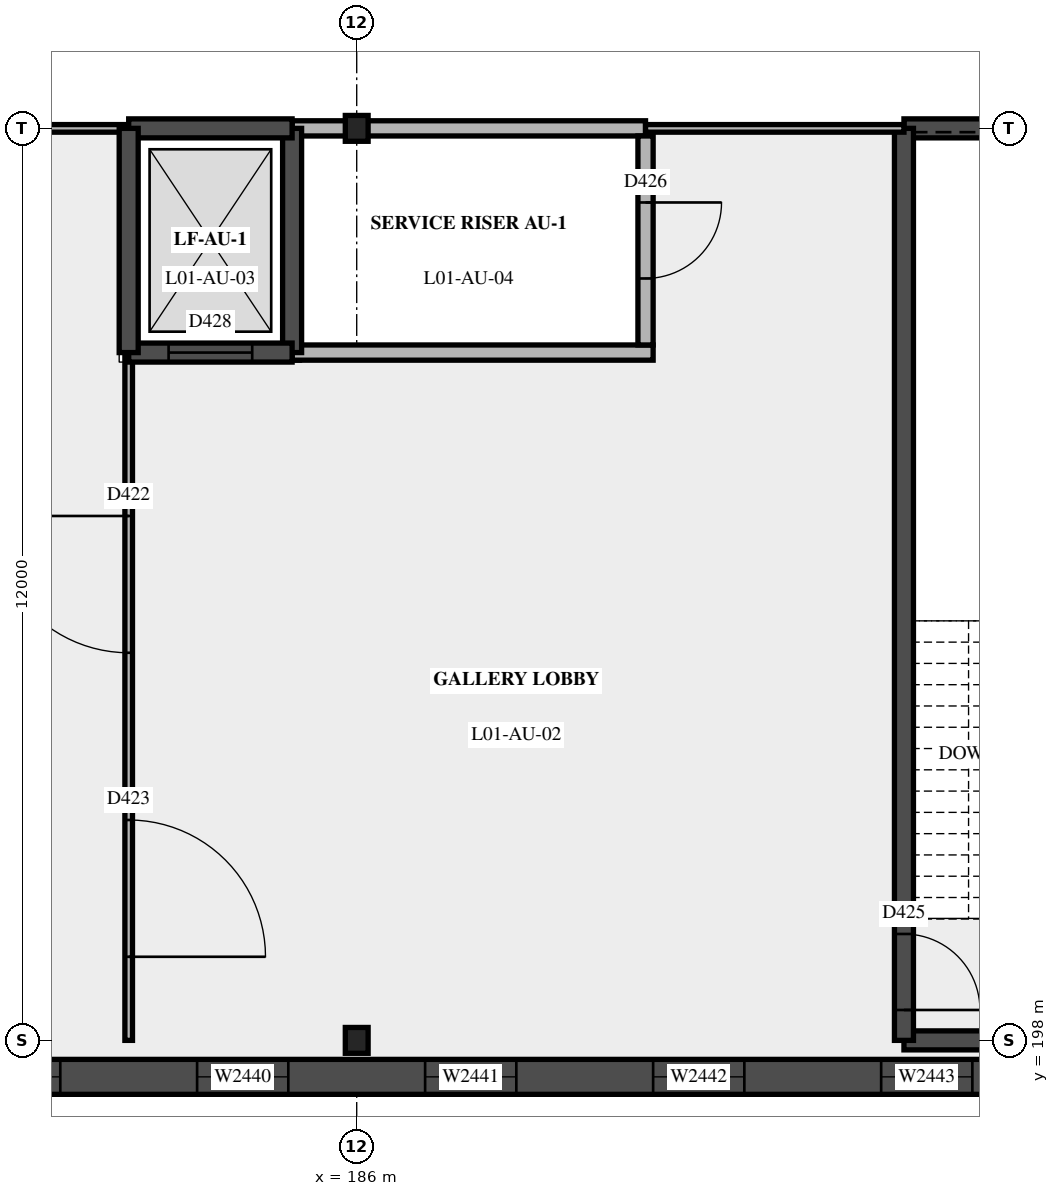
"""IFC4 building model, lengths in metres.
Left out: names, types, materials, properties, quantities, classifications, styles, units other than length and angle.
Written with IfcOpenShell. Run it as: python <this file> out.ifc"""

import sys

from ifc_helpers import new_model, si_unit, direction, frame, frame_2d, origin, origin_2d, place, context, subcontext, project, spatial, rectangle, i_section, extrude, element, fill, save


model = new_model("IFC4")
c1 = context("Model", 3, precision=1e-05, world=origin(), true_north=direction((0.0, 1.0)))
c2 = subcontext(c1, "Body", "Model", "MODEL_VIEW")
j1 = project(units=[si_unit("LENGTHUNIT", "METRE"), si_unit("PLANEANGLEUNIT", "RADIAN")], contexts=[c1])
p1 = place(None, origin())
s1 = spatial("IfcSite", under=j1, at=p1, CompositionType="ELEMENT")
p2 = place(p1, origin())
s2 = spatial("IfcBuilding", under=s1, at=p2, CompositionType="ELEMENT")
p3 = place(p2, frame((0.0, 0.0, 5.4)))
s3 = spatial("IfcBuildingStorey", under=s2, at=p3, CompositionType="ELEMENT", Elevation=5.4)
for number, where, z_axis, x_axis in (
    (1, (186.0, 198.0, 0.0), (0.0, 0.0, 1.0), (1.0, 0.0, 0.0)),
    (2, (186.0, 210.0, 0.0), (0.0, 0.0, 1.0), (1.0, 0.0, 0.0)),
):
    element("IfcColumn", number, at=place(p3, frame(where, z_axis=z_axis, x_axis=x_axis)), inside=s3, PredefinedType="COLUMN", context=c2, shape_type="SweptSolid", body=[
        extrude(i_section(OverallWidth=0.3, OverallDepth=0.34, WebThickness=0.012, FlangeThickness=0.021, at=origin_2d()), origin(), (0.0, 0.0, 1.0), 5.4),
    ])
for number, where, z_axis, x_axis in (
    (3, (193.2, 198.0, 0.0), (0.0, 0.0, 1.0), (1.0, 0.0, 0.0)),
    (4, (193.2, 210.0, 0.0), (0.0, 0.0, 1.0), (1.0, 0.0, 0.0)),
):
    element("IfcWall", number, at=place(p3, frame(where, z_axis=z_axis, x_axis=x_axis)), inside=s3, PredefinedType="SHEAR", context=c2, shape_type="SweptSolid", body=[
        extrude(rectangle(XDim=4.65, YDim=0.25, at=frame_2d((2.325, 0.0))), origin(), (0.0, 0.0, 1.0), 4.6),
    ])
p4 = place(p3, frame((193.2, 198.0, 0.0), z_axis=(0.0, 0.0, 1.0), x_axis=(0.0, 1.0, 0.0)))
e5 = element("IfcWall", 5, at=p4, inside=s3, PredefinedType="SHEAR", context=c2, shape_type="SweptSolid", body=[
    extrude(rectangle(XDim=12.0, YDim=0.25, at=frame_2d((6.0, 0.0))), origin(), (0.0, 0.0, 1.0), 4.6),
])
p5 = place(p4, frame((0.4, 0.0, 0.0)))
e6 = element("IfcOpeningElement", 6, at=p5, cuts=e5, PredefinedType="OPENING", context=c2, shape_type="SweptSolid", body=[
    extrude(rectangle(XDim=1.0, YDim=2.1, at=frame_2d((0.5, 1.05))), frame((0.0, 0.135, 0.0), z_axis=(0.0, -1.0, 0.0), x_axis=(1.0, 0.0, 0.0)), (0.0, 0.0, 1.0), 0.27),
])
p6 = place(p3, frame((161.75, 197.52, 0.0), z_axis=(0.0, 0.0, 1.0), x_axis=(1.0, 0.0, 0.0)))
e7 = element("IfcWall", 7, at=p6, inside=s3, PredefinedType="SOLIDWALL", context=c2, shape_type="SweptSolid", body=[
    extrude(rectangle(XDim=36.5, YDim=0.46, at=frame_2d((18.25, 0.0))), origin(), (0.0, 0.0, 1.0), 5.4),
])
p7 = place(p6, frame((1.15, 0.0, 0.9)))
e8 = element("IfcOpeningElement", 8, at=p7, cuts=e7, PredefinedType="OPENING", context=c2, shape_type="SweptSolid", body=[
    extrude(rectangle(XDim=1.2, YDim=3.3, at=frame_2d((0.6, 1.65))), frame((0.0, 0.24, 0.0), z_axis=(0.0, -1.0, 0.0), x_axis=(1.0, 0.0, 0.0)), (0.0, 0.0, 1.0), 0.48),
])
p8 = place(p6, frame((4.15, 0.0, 0.9)))
e9 = element("IfcOpeningElement", 9, at=p8, cuts=e7, PredefinedType="OPENING", context=c2, shape_type="SweptSolid", body=[
    extrude(rectangle(XDim=1.2, YDim=3.3, at=frame_2d((0.6, 1.65))), frame((0.0, 0.24, 0.0), z_axis=(0.0, -1.0, 0.0), x_axis=(1.0, 0.0, 0.0)), (0.0, 0.0, 1.0), 0.48),
])
p9 = place(p6, frame((7.15, 0.0, 0.9)))
e10 = element("IfcOpeningElement", 10, at=p9, cuts=e7, PredefinedType="OPENING", context=c2, shape_type="SweptSolid", body=[
    extrude(rectangle(XDim=1.2, YDim=3.3, at=frame_2d((0.6, 1.65))), frame((0.0, 0.24, 0.0), z_axis=(0.0, -1.0, 0.0), x_axis=(1.0, 0.0, 0.0)), (0.0, 0.0, 1.0), 0.48),
])
p10 = place(p6, frame((10.15, 0.0, 0.9)))
e11 = element("IfcOpeningElement", 11, at=p10, cuts=e7, PredefinedType="OPENING", context=c2, shape_type="SweptSolid", body=[
    extrude(rectangle(XDim=1.2, YDim=3.3, at=frame_2d((0.6, 1.65))), frame((0.0, 0.24, 0.0), z_axis=(0.0, -1.0, 0.0), x_axis=(1.0, 0.0, 0.0)), (0.0, 0.0, 1.0), 0.48),
])
p11 = place(p6, frame((13.15, 0.0, 0.9)))
e12 = element("IfcOpeningElement", 12, at=p11, cuts=e7, PredefinedType="OPENING", context=c2, shape_type="SweptSolid", body=[
    extrude(rectangle(XDim=1.2, YDim=3.3, at=frame_2d((0.6, 1.65))), frame((0.0, 0.24, 0.0), z_axis=(0.0, -1.0, 0.0), x_axis=(1.0, 0.0, 0.0)), (0.0, 0.0, 1.0), 0.48),
])
p12 = place(p6, frame((16.15, 0.0, 0.9)))
e13 = element("IfcOpeningElement", 13, at=p12, cuts=e7, PredefinedType="OPENING", context=c2, shape_type="SweptSolid", body=[
    extrude(rectangle(XDim=1.2, YDim=3.3, at=frame_2d((0.6, 1.65))), frame((0.0, 0.24, 0.0), z_axis=(0.0, -1.0, 0.0), x_axis=(1.0, 0.0, 0.0)), (0.0, 0.0, 1.0), 0.48),
])
p13 = place(p6, frame((19.15, 0.0, 0.9)))
e14 = element("IfcOpeningElement", 14, at=p13, cuts=e7, PredefinedType="OPENING", context=c2, shape_type="SweptSolid", body=[
    extrude(rectangle(XDim=1.2, YDim=3.3, at=frame_2d((0.6, 1.65))), frame((0.0, 0.24, 0.0), z_axis=(0.0, -1.0, 0.0), x_axis=(1.0, 0.0, 0.0)), (0.0, 0.0, 1.0), 0.48),
])
p14 = place(p6, frame((22.15, 0.0, 0.9)))
e15 = element("IfcOpeningElement", 15, at=p14, cuts=e7, PredefinedType="OPENING", context=c2, shape_type="SweptSolid", body=[
    extrude(rectangle(XDim=1.2, YDim=3.3, at=frame_2d((0.6, 1.65))), frame((0.0, 0.24, 0.0), z_axis=(0.0, -1.0, 0.0), x_axis=(1.0, 0.0, 0.0)), (0.0, 0.0, 1.0), 0.48),
])
p15 = place(p6, frame((25.15, 0.0, 0.9)))
e16 = element("IfcOpeningElement", 16, at=p15, cuts=e7, PredefinedType="OPENING", context=c2, shape_type="SweptSolid", body=[
    extrude(rectangle(XDim=1.2, YDim=3.3, at=frame_2d((0.6, 1.65))), frame((0.0, 0.24, 0.0), z_axis=(0.0, -1.0, 0.0), x_axis=(1.0, 0.0, 0.0)), (0.0, 0.0, 1.0), 0.48),
])
p16 = place(p6, frame((28.15, 0.0, 0.9)))
e17 = element("IfcOpeningElement", 17, at=p16, cuts=e7, PredefinedType="OPENING", context=c2, shape_type="SweptSolid", body=[
    extrude(rectangle(XDim=1.2, YDim=3.3, at=frame_2d((0.6, 1.65))), frame((0.0, 0.24, 0.0), z_axis=(0.0, -1.0, 0.0), x_axis=(1.0, 0.0, 0.0)), (0.0, 0.0, 1.0), 0.48),
])
p17 = place(p6, frame((31.15, 0.0, 0.9)))
e18 = element("IfcOpeningElement", 18, at=p17, cuts=e7, PredefinedType="OPENING", context=c2, shape_type="SweptSolid", body=[
    extrude(rectangle(XDim=1.2, YDim=3.3, at=frame_2d((0.6, 1.65))), frame((0.0, 0.24, 0.0), z_axis=(0.0, -1.0, 0.0), x_axis=(1.0, 0.0, 0.0)), (0.0, 0.0, 1.0), 0.48),
])
p18 = place(p6, frame((34.15, 0.0, 0.9)))
e19 = element("IfcOpeningElement", 19, at=p18, cuts=e7, PredefinedType="OPENING", context=c2, shape_type="SweptSolid", body=[
    extrude(rectangle(XDim=1.2, YDim=3.3, at=frame_2d((0.6, 1.65))), frame((0.0, 0.24, 0.0), z_axis=(0.0, -1.0, 0.0), x_axis=(1.0, 0.0, 0.0)), (0.0, 0.0, 1.0), 0.48),
])
p19 = place(p3, frame((185.15, 207.05, 0.0), z_axis=(0.0, 0.0, 1.0), x_axis=(1.0, 0.0, 0.0)))
e20 = element("IfcWall", 20, at=p19, inside=s3, PredefinedType="PARTITIONING", context=c2, shape_type="SweptSolid", body=[
    extrude(rectangle(XDim=4.75, YDim=0.2, at=frame_2d((2.375, 0.0))), origin(), (0.0, 0.0, 1.0), 3.6),
])
p20 = place(p3, frame((162.0, 210.0, 0.0), z_axis=(0.0, 0.0, 1.0), x_axis=(1.0, 0.0, 0.0)))
e21 = element("IfcWall", 21, at=p20, inside=s3, PredefinedType="PARTITIONING", context=c2, shape_type="SweptSolid", body=[
    extrude(rectangle(XDim=21.0, YDim=0.1, at=frame_2d((10.5, 0.0))), origin(), (0.0, 0.0, 1.0), 3.6),
])
p21 = place(p3, frame((185.15, 210.0, 0.0), z_axis=(0.0, 0.0, 1.0), x_axis=(1.0, 0.0, 0.0)))
e22 = element("IfcWall", 22, at=p21, inside=s3, PredefinedType="PARTITIONING", context=c2, shape_type="SweptSolid", body=[
    extrude(rectangle(XDim=4.65, YDim=0.2, at=frame_2d((2.325, 0.0))), origin(), (0.0, 0.0, 1.0), 3.6),
])
p22 = place(p3, frame((189.8, 210.0, 0.0), z_axis=(0.0, 0.0, 1.0), x_axis=(1.0, 0.0, 0.0)))
e23 = element("IfcWall", 23, at=p22, inside=s3, PredefinedType="PARTITIONING", context=c2, shape_type="SweptSolid", body=[
    extrude(rectangle(XDim=3.4, YDim=0.1, at=frame_2d((1.7, 0.0))), origin(), (0.0, 0.0, 1.0), 3.6),
])
p23 = place(p3, frame((183.0, 198.0, 0.0), z_axis=(0.0, 0.0, 1.0), x_axis=(0.0, 1.0, 0.0)))
e24 = element("IfcWall", 24, at=p23, inside=s3, PredefinedType="PARTITIONING", context=c2, shape_type="SweptSolid", body=[
    extrude(rectangle(XDim=9.05, YDim=0.1, at=frame_2d((4.525, 0.0))), origin(), (0.0, 0.0, 1.0), 3.6),
])
p24 = place(p23, frame((5.1, 0.0, 0.0)))
e25 = element("IfcOpeningElement", 25, at=p24, cuts=e24, PredefinedType="OPENING", context=c2, shape_type="SweptSolid", body=[
    extrude(rectangle(XDim=1.8, YDim=2.1, at=frame_2d((0.9, 1.05))), frame((0.0, 0.06, 0.0), z_axis=(0.0, -1.0, 0.0), x_axis=(1.0, 0.0, 0.0)), (0.0, 0.0, 1.0), 0.12),
])
p25 = place(p23, frame((1.1, 0.0, 0.0)))
e26 = element("IfcOpeningElement", 26, at=p25, cuts=e24, PredefinedType="OPENING", context=c2, shape_type="SweptSolid", body=[
    extrude(rectangle(XDim=1.8, YDim=2.1, at=frame_2d((0.9, 1.05))), frame((0.0, 0.06, 0.0), z_axis=(0.0, -1.0, 0.0), x_axis=(1.0, 0.0, 0.0)), (0.0, 0.0, 1.0), 0.12),
])
p26 = place(p3, frame((189.8, 207.15, 0.0), z_axis=(0.0, 0.0, 1.0), x_axis=(0.0, 1.0, 0.0)))
e27 = element("IfcWall", 27, at=p26, inside=s3, PredefinedType="PARTITIONING", context=c2, shape_type="SweptSolid", body=[
    extrude(rectangle(XDim=2.75, YDim=0.2, at=frame_2d((1.375, 0.0))), origin(), (0.0, 0.0, 1.0), 3.6),
])
p27 = place(p26, frame((0.875, 0.0, 0.0)))
e28 = element("IfcOpeningElement", 28, at=p27, cuts=e27, PredefinedType="OPENING", context=c2, shape_type="SweptSolid", body=[
    extrude(rectangle(XDim=1.0, YDim=2.1, at=frame_2d((0.5, 1.05))), frame((0.0, 0.11, 0.0), z_axis=(0.0, -1.0, 0.0), x_axis=(1.0, 0.0, 0.0)), (0.0, 0.0, 1.0), 0.22),
])
p28 = place(p3, frame((185.15, 207.05, 0.0), z_axis=(0.0, 0.0, 1.0), x_axis=(0.0, 1.0, 0.0)))
e29 = element("IfcWall", 29, at=p28, inside=s3, PredefinedType="SHEAR", context=c2, shape_type="SweptSolid", body=[
    extrude(rectangle(XDim=2.95, YDim=0.25, at=frame_2d((1.475, 0.0))), origin(), (0.0, 0.0, 1.0), 4.2),
])
p29 = place(p3, frame((185.15, 210.0, 0.0), z_axis=(0.0, 0.0, 1.0), x_axis=(-1.0, 0.0, 0.0)))
e30 = element("IfcWall", 30, at=p29, inside=s3, PredefinedType="SHEAR", context=c2, shape_type="SweptSolid", body=[
    extrude(rectangle(XDim=2.15, YDim=0.25, at=frame_2d((1.075, 0.0))), origin(), (0.0, 0.0, 1.0), 4.2),
])
p30 = place(p3, frame((183.0, 207.05, 0.0), z_axis=(0.0, 0.0, 1.0), x_axis=(1.0, 0.0, 0.0)))
e31 = element("IfcWall", 31, at=p30, inside=s3, PredefinedType="SHEAR", context=c2, shape_type="SweptSolid", body=[
    extrude(rectangle(XDim=2.15, YDim=0.25, at=frame_2d((1.075, 0.0))), origin(), (0.0, 0.0, 1.0), 4.2),
])
p31 = place(p30, frame((0.525, 0.0, 0.0)))
e32 = element("IfcOpeningElement", 32, at=p31, cuts=e31, PredefinedType="OPENING", context=c2, shape_type="SweptSolid", body=[
    extrude(rectangle(XDim=1.1, YDim=2.1, at=frame_2d((0.55, 1.05))), frame((0.0, 0.135, 0.0), z_axis=(0.0, -1.0, 0.0), x_axis=(1.0, 0.0, 0.0)), (0.0, 0.0, 1.0), 0.27),
])
p32 = place(p3, frame((183.0, 210.0, 0.0), z_axis=(0.0, 0.0, 1.0), x_axis=(0.0, -1.0, 0.0)))
e33 = element("IfcWall", 33, at=p32, inside=s3, PredefinedType="SHEAR", context=c2, shape_type="SweptSolid", body=[
    extrude(rectangle(XDim=2.95, YDim=0.25, at=frame_2d((1.475, 0.0))), origin(), (0.0, 0.0, 1.0), 4.2),
])
p33 = place(p13, origin())
e34 = element("IfcWindow", 34, at=p33, inside=s3, PartitioningType="SINGLE_PANEL", PredefinedType="WINDOW", context=c2, shape_type="SweptSolid", body=[
    extrude(rectangle(XDim=1.2, YDim=3.3, at=frame_2d((0.6, 1.65))), frame((0.0, 0.03, 0.0), z_axis=(0.0, -1.0, 0.0), x_axis=(1.0, 0.0, 0.0)), (0.0, 0.0, 1.0), 0.06),
])
fill(e14, e34)
p34 = place(p14, origin())
e35 = element("IfcWindow", 35, at=p34, inside=s3, PartitioningType="SINGLE_PANEL", PredefinedType="WINDOW", context=c2, shape_type="SweptSolid", body=[
    extrude(rectangle(XDim=1.2, YDim=3.3, at=frame_2d((0.6, 1.65))), frame((0.0, 0.03, 0.0), z_axis=(0.0, -1.0, 0.0), x_axis=(1.0, 0.0, 0.0)), (0.0, 0.0, 1.0), 0.06),
])
fill(e15, e35)
p35 = place(p15, origin())
e36 = element("IfcWindow", 36, at=p35, inside=s3, PartitioningType="SINGLE_PANEL", PredefinedType="WINDOW", context=c2, shape_type="SweptSolid", body=[
    extrude(rectangle(XDim=1.2, YDim=3.3, at=frame_2d((0.6, 1.65))), frame((0.0, 0.03, 0.0), z_axis=(0.0, -1.0, 0.0), x_axis=(1.0, 0.0, 0.0)), (0.0, 0.0, 1.0), 0.06),
])
fill(e16, e36)
p36 = place(p16, origin())
e37 = element("IfcWindow", 37, at=p36, inside=s3, PartitioningType="SINGLE_PANEL", PredefinedType="WINDOW", context=c2, shape_type="SweptSolid", body=[
    extrude(rectangle(XDim=1.2, YDim=3.3, at=frame_2d((0.6, 1.65))), frame((0.0, 0.03, 0.0), z_axis=(0.0, -1.0, 0.0), x_axis=(1.0, 0.0, 0.0)), (0.0, 0.0, 1.0), 0.06),
])
fill(e17, e37)
p37 = place(p17, origin())
e38 = element("IfcWindow", 38, at=p37, inside=s3, PartitioningType="SINGLE_PANEL", PredefinedType="WINDOW", context=c2, shape_type="SweptSolid", body=[
    extrude(rectangle(XDim=1.2, YDim=3.3, at=frame_2d((0.6, 1.65))), frame((0.0, 0.03, 0.0), z_axis=(0.0, -1.0, 0.0), x_axis=(1.0, 0.0, 0.0)), (0.0, 0.0, 1.0), 0.06),
])
fill(e18, e38)
p38 = place(p24, origin())
e39 = element("IfcDoor", 39, at=p38, inside=s3, OperationType="DOUBLE_DOOR_SINGLE_SWING", PredefinedType="DOOR", context=c2, shape_type="SweptSolid", body=[
    extrude(rectangle(XDim=1.8, YDim=2.1, at=frame_2d((0.9, 1.05))), frame((0.0, 0.025, 0.0), z_axis=(0.0, -1.0, 0.0), x_axis=(1.0, 0.0, 0.0)), (0.0, 0.0, 1.0), 0.05),
])
fill(e25, e39)
p39 = place(p25, origin())
e40 = element("IfcDoor", 40, at=p39, inside=s3, OperationType="DOUBLE_DOOR_SINGLE_SWING", PredefinedType="DOOR", context=c2, shape_type="SweptSolid", body=[
    extrude(rectangle(XDim=1.8, YDim=2.1, at=frame_2d((0.9, 1.05))), frame((0.0, 0.025, 0.0), z_axis=(0.0, -1.0, 0.0), x_axis=(1.0, 0.0, 0.0)), (0.0, 0.0, 1.0), 0.05),
])
fill(e26, e40)
p40 = place(p5, origin())
e41 = element("IfcDoor", 41, at=p40, inside=s3, OperationType="SINGLE_SWING_RIGHT", PredefinedType="DOOR", context=c2, shape_type="SweptSolid", body=[
    extrude(rectangle(XDim=1.0, YDim=2.1, at=frame_2d((0.5, 1.05))), frame((0.0, 0.025, 0.0), z_axis=(0.0, -1.0, 0.0), x_axis=(1.0, 0.0, 0.0)), (0.0, 0.0, 1.0), 0.05),
])
fill(e6, e41)
p41 = place(p27, origin())
e42 = element("IfcDoor", 42, at=p41, inside=s3, OperationType="SINGLE_SWING_LEFT", PredefinedType="DOOR", context=c2, shape_type="SweptSolid", body=[
    extrude(rectangle(XDim=1.0, YDim=2.1, at=frame_2d((0.5, 1.05))), frame((0.0, 0.025, 0.0), z_axis=(0.0, -1.0, 0.0), x_axis=(1.0, 0.0, 0.0)), (0.0, 0.0, 1.0), 0.05),
])
fill(e28, e42)
p42 = place(p31, origin())
e43 = element("IfcDoor", 43, at=p42, inside=s3, OperationType="SLIDING_TO_LEFT", PredefinedType="DOOR", context=c2, shape_type="SweptSolid", body=[
    extrude(rectangle(XDim=1.1, YDim=2.1, at=frame_2d((0.55, 1.05))), frame((0.0, 0.025, 0.0), z_axis=(0.0, -1.0, 0.0), x_axis=(1.0, 0.0, 0.0)), (0.0, 0.0, 1.0), 0.05),
])
fill(e32, e43)
save(model, sys.argv[1])
